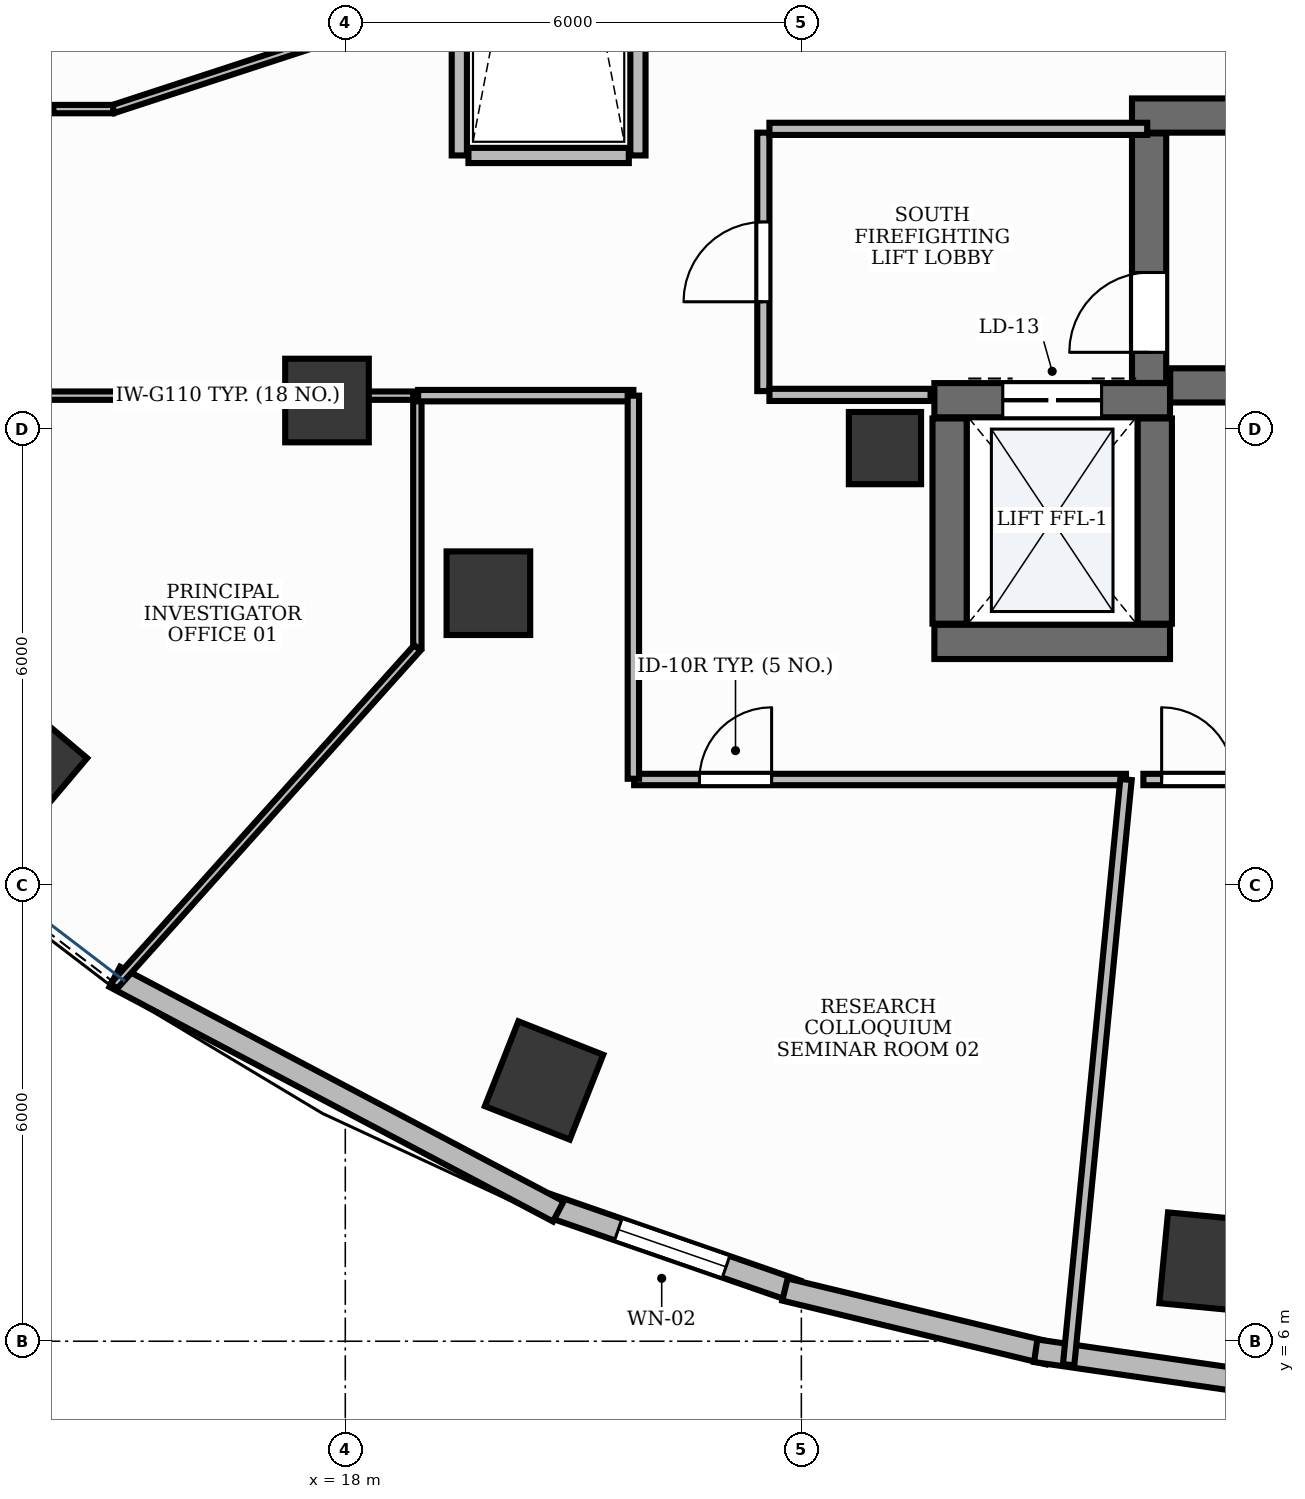
"""IFC4 building model, lengths in metres.
Left out: names, types, materials, properties, quantities, classifications, styles, units other than length and angle.
Written with IfcOpenShell. Run it as: python <this file> out.ifc"""

import sys

from ifc_helpers import new_model, si_unit, direction, frame, frame_2d, origin, origin_2d, place, context, subcontext, project, spatial, rectangle, extrude, element, fill, save


model = new_model("IFC4")
c1 = context("Model", 3, precision=1e-05, world=origin(), true_north=direction((0.0, 1.0)))
c2 = subcontext(c1, "Body", "Model", "MODEL_VIEW")
j1 = project(units=[si_unit("LENGTHUNIT", "METRE"), si_unit("PLANEANGLEUNIT", "RADIAN")], contexts=[c1])
p1 = place(None, origin())
s1 = spatial("IfcSite", under=j1, at=p1, CompositionType="ELEMENT")
p2 = place(p1, origin())
s2 = spatial("IfcBuilding", under=s1, at=p2, CompositionType="ELEMENT")
p3 = place(p2, frame((0.0, 0.0, 98.4)))
s3 = spatial("IfcBuildingStorey", under=s2, at=p3, CompositionType="ELEMENT", Elevation=98.4)
p4 = place(p3, frame((28.852, 18.575, 0.0), z_axis=(0.0, 0.0, 1.0), x_axis=(1.0, 0.0, 0.0)))
e1 = element("IfcWall", 1, at=p4, inside=s3, PredefinedType="SHEAR", context=c2, shape_type="SweptSolid", body=[
    extrude(rectangle(XDim=8.248, YDim=0.45, at=frame_2d((4.124, 0.0))), origin(), (0.0, 0.0, 1.0), 3.9),
])
p5 = place(p3, frame((28.35, 22.125, 0.0), z_axis=(0.0, 0.0, 1.0), x_axis=(1.0, 0.0, 0.0)))
e2 = element("IfcWall", 2, at=p5, inside=s3, PredefinedType="SHEAR", context=c2, shape_type="SweptSolid", body=[
    extrude(rectangle(XDim=8.75, YDim=0.45, at=frame_2d((4.375, 0.0))), origin(), (0.0, 0.0, 1.0), 3.9),
])
p6 = place(p3, frame((28.575, 18.607, 0.0), z_axis=(0.0, 0.0, 1.0), x_axis=(0.0, 1.0, 0.0)))
e3 = element("IfcWall", 3, at=p6, inside=s3, PredefinedType="SHEAR", context=c2, shape_type="SweptSolid", body=[
    extrude(rectangle(XDim=3.283, YDim=0.45, at=frame_2d((1.642, 0.0))), origin(), (0.0, 0.0, 1.0), 3.9),
])
p7 = place(p6, frame((0.403, 0.0, 0.0)))
e4 = element("IfcOpeningElement", 4, at=p7, cuts=e3, PredefinedType="OPENING", context=c2, shape_type="SweptSolid", body=[
    extrude(rectangle(XDim=1.05, YDim=2.15, at=frame_2d((0.525, 1.075))), frame((0.0, 0.24, 0.0), z_axis=(0.0, -1.0, 0.0), x_axis=(1.0, 0.0, 0.0)), (0.0, 0.0, 1.0), 0.48),
])
p8 = place(p3, frame((25.75, 15.2, 0.0), z_axis=(0.0, 0.0, 1.0), x_axis=(1.0, 0.0, 0.0)))
e5 = element("IfcWall", 5, at=p8, inside=s3, PredefinedType="SHEAR", context=c2, shape_type="SweptSolid", body=[
    extrude(rectangle(XDim=3.1, YDim=0.45, at=frame_2d((1.55, 0.0))), origin(), (0.0, 0.0, 1.0), 3.9),
])
p9 = place(p3, frame((25.75, 18.38, 0.0), z_axis=(0.0, 0.0, 1.0), x_axis=(1.0, 0.0, 0.0)))
e6 = element("IfcWall", 6, at=p9, inside=s3, PredefinedType="SHEAR", context=c2, shape_type="SweptSolid", body=[
    extrude(rectangle(XDim=3.1, YDim=0.45, at=frame_2d((1.55, 0.0))), origin(), (0.0, 0.0, 1.0), 3.9),
])
p10 = place(p9, frame((0.9, 0.0, 0.0)))
e7 = element("IfcOpeningElement", 7, at=p10, cuts=e6, PredefinedType="OPENING", context=c2, shape_type="SweptSolid", body=[
    extrude(rectangle(XDim=1.3, YDim=2.2, at=frame_2d((0.65, 1.1))), frame((0.0, 0.24, 0.0), z_axis=(0.0, -1.0, 0.0), x_axis=(1.0, 0.0, 0.0)), (0.0, 0.0, 1.0), 0.48),
])
for number, where, z_axis, x_axis in (
    (8, (25.95, 15.44, 0.0), (0.0, 0.0, 1.0), (0.0, 1.0, 0.0)),
    (9, (28.65, 15.44, 0.0), (0.0, 0.0, 1.0), (0.0, 1.0, 0.0)),
):
    element("IfcWall", number, at=place(p3, frame(where, z_axis=z_axis, x_axis=x_axis)), inside=s3, PredefinedType="SHEAR", context=c2, shape_type="SweptSolid", body=[
        extrude(rectangle(XDim=2.7, YDim=0.45, at=frame_2d((1.35, 0.0))), origin(), (0.0, 0.0, 1.0), 3.9),
    ])
p11 = place(p3, frame((25.1, 17.75, -0.0), z_axis=(0.0, 0.0, 1.0), x_axis=(1.0, 0.0, 0.0)))
e10 = element("IfcColumn", 10, at=p11, inside=s3, PredefinedType="PILASTER", context=c2, shape_type="SweptSolid", body=[
    extrude(rectangle(XDim=0.95, YDim=0.95, at=origin_2d()), origin(), (0.0, 0.0, 1.0), 3.901),
])
p12 = place(p3, frame((17.759, 18.376, -0.0), z_axis=(0.0, 0.0, 1.0), x_axis=(1.0, 0.0, 0.0)))
e11 = element("IfcColumn", 11, at=p12, inside=s3, PredefinedType="COLUMN", context=c2, shape_type="SweptSolid", body=[
    extrude(rectangle(XDim=1.1, YDim=1.1, at=origin_2d()), origin(), (0.0, 0.0, 1.0), 3.901),
])
p13 = place(p3, frame((13.758, 13.6, -0.0), z_axis=(0.0, 0.0, 1.0), x_axis=(-0.764246456939, 0.644924300253, 0.0)))
e12 = element("IfcColumn", 12, at=p13, inside=s3, PredefinedType="COLUMN", context=c2, shape_type="SweptSolid", body=[
    extrude(rectangle(XDim=1.2, YDim=1.2, at=origin_2d()), origin(), (0.0, 0.0, 1.0), 3.901),
])
p14 = place(p3, frame((19.883, 15.841, -0.0), z_axis=(0.0, 0.0, 1.0), x_axis=(1.0, 0.0, 0.0)))
e13 = element("IfcColumn", 13, at=p14, inside=s3, PredefinedType="COLUMN", context=c2, shape_type="SweptSolid", body=[
    extrude(rectangle(XDim=1.1, YDim=1.1, at=origin_2d()), origin(), (0.0, 0.0, 1.0), 3.901),
])
for number, where, z_axis, x_axis in (
    (14, (20.615, 9.431, -0.0), (0.0, 0.0, 1.0), (-0.93, 0.367, 0.0)),
    (15, (29.364, 7.041, -0.0), (0.0, 0.0, 1.0), (-0.995, 0.095, 0.0)),
):
    element("IfcColumn", number, at=place(p3, frame(where, z_axis=z_axis, x_axis=x_axis)), inside=s3, PredefinedType="COLUMN", context=c2, shape_type="SweptSolid", body=[
        extrude(rectangle(XDim=1.2, YDim=1.2, at=origin_2d()), origin(), (0.0, 0.0, 1.0), 3.901),
    ])
p15 = place(p3, frame((20.662, 7.792, 0.0), z_axis=(0.0, 0.0, 1.0), x_axis=(0.944878029854, -0.3274225232, 0.0)))
e16 = element("IfcWall", 16, at=p15, inside=s3, PredefinedType="STANDARD", context=c2, shape_type="SweptSolid", body=[
    extrude(rectangle(XDim=3.467, YDim=0.3, at=frame_2d((1.734, 0.0))), origin(), (0.0, 0.0, 1.0), 3.9),
])
p16 = place(p15, frame((0.984, 0.0, 0.95)))
e17 = element("IfcOpeningElement", 17, at=p16, cuts=e16, PredefinedType="OPENING", context=c2, shape_type="SweptSolid", body=[
    extrude(rectangle(XDim=1.5, YDim=1.8, at=frame_2d((0.75, 0.9))), frame((0.0, 0.165, 0.0), z_axis=(0.0, -1.0, 0.0), x_axis=(1.0, 0.0, 0.0)), (0.0, 0.0, 1.0), 0.33),
])
p17 = place(p3, frame((14.967, 10.794, 0.0), z_axis=(0.0, 0.0, 1.0), x_axis=(0.883986649445, -0.467512142734, 0.0)))
e18 = element("IfcWall", 18, at=p17, inside=s3, PredefinedType="STANDARD", context=c2, shape_type="SweptSolid", body=[
    extrude(rectangle(XDim=6.601, YDim=0.3, at=frame_2d((3.301, 0.0))), origin(), (0.0, 0.0, 1.0), 3.47),
])
p18 = place(p3, frame((23.784, 6.68, 0.0), z_axis=(0.0, 0.0, 1.0), x_axis=(0.972043452321, -0.234801036625, 0.0)))
e19 = element("IfcWall", 19, at=p18, inside=s3, PredefinedType="STANDARD", context=c2, shape_type="SweptSolid", body=[
    extrude(rectangle(XDim=3.569, YDim=0.3, at=frame_2d((1.784, 0.0))), origin(), (0.0, 0.0, 1.0), 3.9),
])
p19 = place(p3, frame((27.083, 5.875, 0.0), z_axis=(0.0, 0.0, 1.0), x_axis=(0.989734732902, -0.142916613754, 0.0)))
e20 = element("IfcWall", 20, at=p19, inside=s3, PredefinedType="STANDARD", context=c2, shape_type="SweptSolid", body=[
    extrude(rectangle(XDim=3.611, YDim=0.3, at=frame_2d((1.806, 0.0))), origin(), (0.0, 0.0, 1.0), 3.9),
])
for number, where, z_axis, x_axis in (
    (21, (19.5, 21.6, 0.0), (0.0, 0.0, 1.0), (0.0, 1.0, 0.0)),
    (22, (21.85, 21.6, 0.0), (0.0, 0.0, 1.0), (0.0, 1.0, 0.0)),
):
    element("IfcWall", number, at=place(p3, frame(where, z_axis=z_axis, x_axis=x_axis)), inside=s3, PredefinedType="PARTITIONING", context=c2, shape_type="SweptSolid", body=[
        extrude(rectangle(XDim=10.8, YDim=0.2, at=frame_2d((5.4, 0.0))), origin(), (0.0, 0.0, 1.0), 2.91),
    ])
p20 = place(p3, frame((19.62, 21.6, 0.0), z_axis=(0.0, 0.0, 1.0), x_axis=(1.0, 0.0, 0.0)))
e23 = element("IfcWall", 23, at=p20, inside=s3, PredefinedType="PARTITIONING", context=c2, shape_type="SweptSolid", body=[
    extrude(rectangle(XDim=2.11, YDim=0.2, at=frame_2d((1.055, 0.0))), origin(), (0.0, 0.0, 1.0), 2.91),
])
p21 = place(p3, frame((23.5, 18.5, 0.0), z_axis=(0.0, 0.0, 1.0), x_axis=(0.0, 1.0, 0.0)))
e24 = element("IfcWall", 24, at=p21, inside=s3, PredefinedType="PARTITIONING", context=c2, shape_type="SweptSolid", body=[
    extrude(rectangle(XDim=3.4, YDim=0.16, at=frame_2d((1.7, 0.0))), origin(), (0.0, 0.0, 1.0), 2.91),
])
p22 = place(p21, frame((1.175, 0.0, 0.0)))
e25 = element("IfcOpeningElement", 25, at=p22, cuts=e24, PredefinedType="OPENING", context=c2, shape_type="SweptSolid", body=[
    extrude(rectangle(XDim=1.05, YDim=2.15, at=frame_2d((0.525, 1.075))), frame((0.0, 0.095, 0.0), z_axis=(0.0, -1.0, 0.0), x_axis=(1.0, 0.0, 0.0)), (0.0, 0.0, 1.0), 0.19),
])
p23 = place(p3, frame((23.58, 21.95, 0.0), z_axis=(0.0, 0.0, 1.0), x_axis=(1.0, 0.0, 0.0)))
e26 = element("IfcWall", 26, at=p23, inside=s3, PredefinedType="PARTITIONING", context=c2, shape_type="SweptSolid", body=[
    extrude(rectangle(XDim=4.97, YDim=0.16, at=frame_2d((2.485, 0.0))), origin(), (0.0, 0.0, 1.0), 2.91),
])
p24 = place(p3, frame((23.58, 18.45, 0.0), z_axis=(0.0, 0.0, 1.0), x_axis=(1.0, 0.0, 0.0)))
e27 = element("IfcWall", 27, at=p24, inside=s3, PredefinedType="PARTITIONING", context=c2, shape_type="SweptSolid", body=[
    extrude(rectangle(XDim=2.12, YDim=0.16, at=frame_2d((1.06, 0.0))), origin(), (0.0, 0.0, 1.0), 2.91),
])
p25 = place(p3, frame((11.59, 18.44, 0.0), z_axis=(0.0, 0.0, 1.0), x_axis=(1.0, 0.0, 0.0)))
e28 = element("IfcWall", 28, at=p25, inside=s3, PredefinedType="MOVABLE", context=c2, shape_type="SweptSolid", body=[
    extrude(rectangle(XDim=7.358, YDim=0.11, at=frame_2d((3.679, 0.0))), origin(), (0.0, 0.0, 1.0), 2.91),
])
p26 = place(p25, frame((1.206, 0.0, 0.0)))
e29 = element("IfcOpeningElement", 29, at=p26, cuts=e28, PredefinedType="OPENING", context=c2, shape_type="SweptSolid", body=[
    extrude(rectangle(XDim=0.95, YDim=2.15, at=frame_2d((0.475, 1.075))), frame((0.0, 0.07, 0.0), z_axis=(0.0, -1.0, 0.0), x_axis=(1.0, 0.0, 0.0)), (0.0, 0.0, 1.0), 0.14),
])
p27 = place(p3, frame((21.8, 13.39, 0.0), z_axis=(0.0, 0.0, 1.0), x_axis=(1.0, 0.0, 0.0)))
e30 = element("IfcWall", 30, at=p27, inside=s3, PredefinedType="PARTITIONING", context=c2, shape_type="SweptSolid", body=[
    extrude(rectangle(XDim=6.471, YDim=0.15, at=frame_2d((3.236, 0.0))), origin(), (0.0, 0.0, 1.0), 2.91),
])
p28 = place(p27, frame((0.859, 0.0, 0.0)))
e31 = element("IfcOpeningElement", 31, at=p28, cuts=e30, PredefinedType="OPENING", context=c2, shape_type="SweptSolid", body=[
    extrude(rectangle(XDim=0.95, YDim=2.15, at=frame_2d((0.475, 1.075))), frame((0.0, 0.09, 0.0), z_axis=(0.0, -1.0, 0.0), x_axis=(1.0, 0.0, 0.0)), (0.0, 0.0, 1.0), 0.18),
])
p29 = place(p3, frame((28.5, 13.39, 0.0), z_axis=(0.0, 0.0, 1.0), x_axis=(1.0, 0.0, 0.0)))
e32 = element("IfcWall", 32, at=p29, inside=s3, PredefinedType="PARTITIONING", context=c2, shape_type="SweptSolid", body=[
    extrude(rectangle(XDim=7.1, YDim=0.15, at=frame_2d((3.55, 0.0))), origin(), (0.0, 0.0, 1.0), 2.91),
])
p30 = place(p29, frame((0.24, 0.0, 0.0)))
e33 = element("IfcOpeningElement", 33, at=p30, cuts=e32, PredefinedType="OPENING", context=c2, shape_type="SweptSolid", body=[
    extrude(rectangle(XDim=0.95, YDim=2.15, at=frame_2d((0.475, 1.075))), frame((0.0, 0.09, 0.0), z_axis=(0.0, -1.0, 0.0), x_axis=(1.0, 0.0, 0.0)), (0.0, 0.0, 1.0), 0.18),
])
p31 = place(p3, frame((18.948, 18.44, 0.0), z_axis=(0.0, 0.0, 1.0), x_axis=(0.0, -1.0, 0.0)))
e34 = element("IfcWall", 34, at=p31, inside=s3, PredefinedType="MOVABLE", context=c2, shape_type="SweptSolid", body=[
    extrude(rectangle(XDim=3.317, YDim=0.11, at=frame_2d((1.659, 0.0))), origin(), (0.0, 0.0, 1.0), 2.91),
])
p32 = place(p3, frame((18.948, 15.123, 0.0), z_axis=(0.0, 0.0, 1.0), x_axis=(-0.667833771006, -0.744310455592, 0.0)))
e35 = element("IfcWall", 35, at=p32, inside=s3, PredefinedType="MOVABLE", context=c2, shape_type="SweptSolid", body=[
    extrude(rectangle(XDim=5.979, YDim=0.11, at=frame_2d((2.99, 0.0))), origin(), (0.0, 0.0, 1.0), 2.91),
])
p33 = place(p3, frame((18.958, 18.44, 0.0), z_axis=(0.0, 0.0, 1.0), x_axis=(1.0, 0.0, 0.0)))
e36 = element("IfcWall", 36, at=p33, inside=s3, PredefinedType="PARTITIONING", context=c2, shape_type="SweptSolid", body=[
    extrude(rectangle(XDim=2.832, YDim=0.15, at=frame_2d((1.416, 0.0))), origin(), (0.0, 0.0, 1.0), 2.91),
])
p34 = place(p3, frame((21.79, 18.44, 0.0), z_axis=(0.0, 0.0, 1.0), x_axis=(0.0, -1.0, 0.0)))
e37 = element("IfcWall", 37, at=p34, inside=s3, PredefinedType="PARTITIONING", context=c2, shape_type="SweptSolid", body=[
    extrude(rectangle(XDim=5.04, YDim=0.15, at=frame_2d((2.52, 0.0))), origin(), (0.0, 0.0, 1.0), 2.91),
])
p35 = place(p3, frame((28.271, 13.39, 0.0), z_axis=(0.0, 0.0, 1.0), x_axis=(-0.097584908723, -0.995227202999, 0.0)))
e38 = element("IfcWall", 38, at=p35, inside=s3, PredefinedType="PARTITIONING", context=c2, shape_type="SweptSolid", body=[
    extrude(rectangle(XDim=7.736, YDim=0.15, at=frame_2d((3.868, 0.0))), origin(), (0.0, 0.0, 1.0), 2.91),
])
p36 = place(p3, frame((18.948, 23.518, 0.0), z_axis=(0.0, 0.0, 1.0), x_axis=(-0.950522660163, -0.31065523095, 0.0)))
e39 = element("IfcWall", 39, at=p36, inside=s3, PredefinedType="MOVABLE", context=c2, shape_type="SweptSolid", body=[
    extrude(rectangle(XDim=4.21, YDim=0.11, at=frame_2d((2.105, 0.0))), origin(), (0.0, 0.0, 1.0), 2.91),
])
p37 = place(p3, frame((14.946, 22.21, 0.0), z_axis=(0.0, 0.0, 1.0), x_axis=(-1.0, 0.0, 0.0)))
e40 = element("IfcWall", 40, at=p37, inside=s3, PredefinedType="MOVABLE", context=c2, shape_type="SweptSolid", body=[
    extrude(rectangle(XDim=0.786, YDim=0.11, at=frame_2d((0.393, 0.0))), origin(), (0.0, 0.0, 1.0), 2.91),
])
p38 = place(p16, origin())
e41 = element("IfcWindow", 41, at=p38, inside=s3, PartitioningType="DOUBLE_PANEL_VERTICAL", PredefinedType="WINDOW", context=c2, shape_type="SweptSolid", body=[
    extrude(rectangle(XDim=1.5, YDim=1.8, at=frame_2d((0.75, 0.9))), frame((0.0, 0.03, 0.0), z_axis=(0.0, -1.0, 0.0), x_axis=(1.0, 0.0, 0.0)), (0.0, 0.0, 1.0), 0.06),
])
fill(e17, e41)
p39 = place(p7, origin())
e42 = element("IfcDoor", 42, at=p39, inside=s3, OperationType="SINGLE_SWING_LEFT", PredefinedType="DOOR", context=c2, shape_type="SweptSolid", body=[
    extrude(rectangle(XDim=1.05, YDim=2.15, at=frame_2d((0.525, 1.075))), frame((0.0, 0.025, 0.0), z_axis=(0.0, -1.0, 0.0), x_axis=(1.0, 0.0, 0.0)), (0.0, 0.0, 1.0), 0.05),
])
fill(e4, e42)
p40 = place(p10, origin())
e43 = element("IfcDoor", 43, at=p40, inside=s3, OperationType="DOUBLE_DOOR_SLIDING", PredefinedType="DOOR", context=c2, shape_type="SweptSolid", body=[
    extrude(rectangle(XDim=1.3, YDim=2.2, at=frame_2d((0.65, 1.1))), frame((0.0, 0.025, 0.0), z_axis=(0.0, -1.0, 0.0), x_axis=(1.0, 0.0, 0.0)), (0.0, 0.0, 1.0), 0.05),
])
fill(e7, e43)
p41 = place(p22, origin())
e44 = element("IfcDoor", 44, at=p41, inside=s3, OperationType="SINGLE_SWING_LEFT", PredefinedType="DOOR", context=c2, shape_type="SweptSolid", body=[
    extrude(rectangle(XDim=1.05, YDim=2.15, at=frame_2d((0.525, 1.075))), frame((0.0, 0.025, 0.0), z_axis=(0.0, -1.0, 0.0), x_axis=(1.0, 0.0, 0.0)), (0.0, 0.0, 1.0), 0.05),
])
fill(e25, e44)
p42 = place(p28, origin())
e45 = element("IfcDoor", 45, at=p42, inside=s3, OperationType="SINGLE_SWING_RIGHT", PredefinedType="DOOR", context=c2, shape_type="SweptSolid", body=[
    extrude(rectangle(XDim=0.95, YDim=2.15, at=frame_2d((0.475, 1.075))), frame((0.0, 0.025, 0.0), z_axis=(0.0, -1.0, 0.0), x_axis=(1.0, 0.0, 0.0)), (0.0, 0.0, 1.0), 0.05),
])
fill(e31, e45)
p43 = place(p30, origin())
e46 = element("IfcDoor", 46, at=p43, inside=s3, OperationType="SINGLE_SWING_LEFT", PredefinedType="DOOR", context=c2, shape_type="SweptSolid", body=[
    extrude(rectangle(XDim=0.95, YDim=2.15, at=frame_2d((0.475, 1.075))), frame((0.0, 0.025, 0.0), z_axis=(0.0, -1.0, 0.0), x_axis=(1.0, 0.0, 0.0)), (0.0, 0.0, 1.0), 0.05),
])
fill(e33, e46)
save(model, sys.argv[1])
